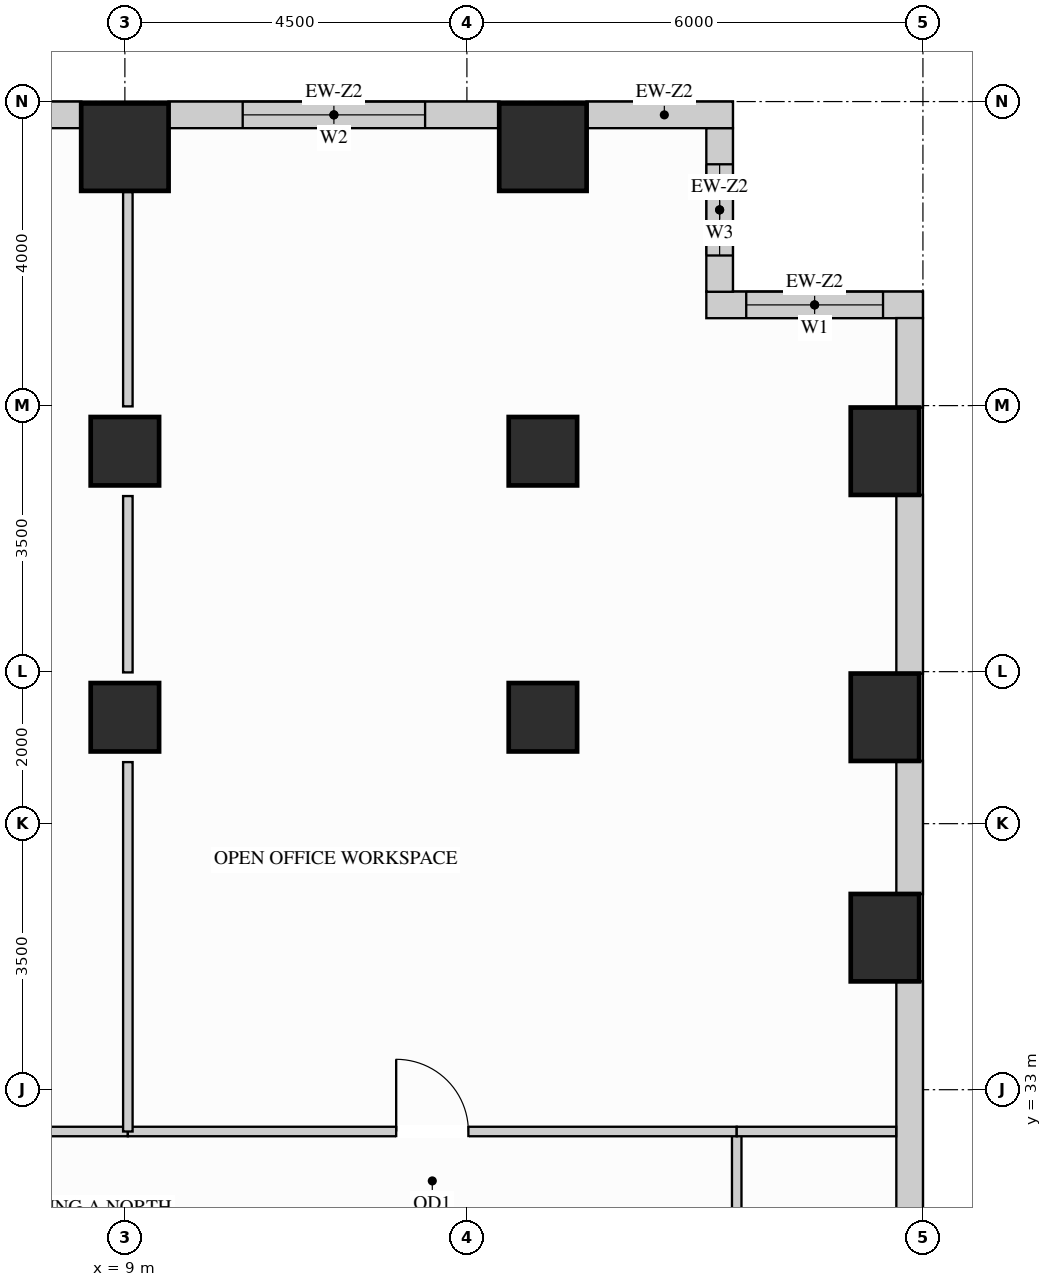
"""IFC4 building model, lengths in metres.
Left out: names, types, materials, properties, quantities, classifications, styles, units other than length and angle.
Written with IfcOpenShell. Run it as: python <this file> out.ifc"""

import sys

from ifc_helpers import new_model, si_unit, direction, frame, frame_2d, origin, origin_2d, place, context, subcontext, project, spatial, rectangle, extrude, source, transform, mapped, element, fill, save


model = new_model("IFC4")
c1 = context("Model", 3, precision=1e-05, world=origin(), true_north=direction((0.0, 1.0)))
c2 = subcontext(c1, "Body", "Model", "MODEL_VIEW")
j1 = project(units=[si_unit("LENGTHUNIT", "METRE"), si_unit("PLANEANGLEUNIT", "RADIAN")], contexts=[c1])
p1 = place(None, origin())
s1 = spatial("IfcSite", under=j1, at=p1, CompositionType="ELEMENT")
p2 = place(p1, origin())
s2 = spatial("IfcBuilding", under=s1, at=p2, CompositionType="ELEMENT")
p3 = place(p2, frame((0.0, 0.0, 81.0)))
s3 = spatial("IfcBuildingStorey", under=s2, at=p3, CompositionType="ELEMENT", Elevation=81.0)
m1 = source(origin(), c2, "Body", "SweptSolid", [
    extrude(rectangle(XDim=0.9, YDim=0.9, at=origin_2d()), origin(), (0.0, 0.0, 1.0), 3.38),
])
for number, where, z_axis, x_axis in (
    (1, (14.5, 37.9, 0.0), (0.0, 0.0, 1.0), (1.0, 0.0, 0.0)),
    (2, (14.5, 41.4, 0.0), (0.0, 0.0, 1.0), (1.0, 0.0, 0.0)),
    (3, (9.0, 37.9, 0.0), (0.0, 0.0, 1.0), (1.0, 0.0, 0.0)),
    (4, (9.0, 41.4, 0.0), (0.0, 0.0, 1.0), (1.0, 0.0, 0.0)),
):
    element("IfcColumn", number, at=place(p3, frame(where, z_axis=z_axis, x_axis=x_axis)), inside=s3, PredefinedType="COLUMN", context=c2, shape_type="MappedRepresentation", body=[
        mapped(m1, transform((0.0, 0.0, 0.0), x_axis=(1.0, 0.0, 0.0), y_axis=(0.0, 1.0, 0.0), z_axis=(0.0, 0.0, 1.0))),
    ])
m2 = source(origin(), c2, "Body", "SweptSolid", [
    extrude(rectangle(XDim=0.9, YDim=1.15, at=origin_2d()), origin(), (0.0, 0.0, 1.0), 3.38),
])
for number, where, z_axis, x_axis in (
    (5, (19.0, 35.0, 0.0), (0.0, 0.0, 1.0), (1.0, 0.0, 0.0)),
    (6, (19.0, 37.9, 0.0), (0.0, 0.0, 1.0), (1.0, 0.0, 0.0)),
    (7, (19.0, 41.4, 0.0), (0.0, 0.0, 1.0), (1.0, 0.0, 0.0)),
):
    element("IfcColumn", number, at=place(p3, frame(where, z_axis=z_axis, x_axis=x_axis)), inside=s3, PredefinedType="COLUMN", context=c2, shape_type="MappedRepresentation", body=[
        mapped(m2, transform((0.0, 0.0, 0.0), x_axis=(1.0, 0.0, 0.0), y_axis=(0.0, 1.0, 0.0), z_axis=(0.0, 0.0, 1.0))),
    ])
m3 = source(origin(), c2, "Body", "SweptSolid", [
    extrude(rectangle(XDim=1.15, YDim=1.15, at=origin_2d()), origin(), (0.0, 0.0, 1.0), 3.38),
])
for number, where, z_axis, x_axis in (
    (8, (14.5, 45.4, 0.0), (0.0, 0.0, 1.0), (1.0, 0.0, 0.0)),
    (9, (9.0, 45.4, 0.0), (0.0, 0.0, 1.0), (1.0, 0.0, 0.0)),
):
    element("IfcColumn", number, at=place(p3, frame(where, z_axis=z_axis, x_axis=x_axis)), inside=s3, PredefinedType="COLUMN", context=c2, shape_type="MappedRepresentation", body=[
        mapped(m3, transform((0.0, 0.0, 0.0), x_axis=(1.0, 0.0, 0.0), y_axis=(0.0, 1.0, 0.0), z_axis=(0.0, 0.0, 1.0))),
    ])
p4 = place(p3, frame((19.5, 43.325, 0.0), z_axis=(0.0, 0.0, 1.0), x_axis=(-1.0, 0.0, 0.0)))
e10 = element("IfcWall", 10, at=p4, inside=s3, PredefinedType="SOLIDWALL", context=c2, shape_type="SweptSolid", body=[
    extrude(rectangle(XDim=2.85, YDim=0.35, at=frame_2d((1.425, 0.0))), origin(), (0.0, 0.0, 1.0), 3.365),
])
p5 = place(p4, frame((0.525, 0.0, 0.78)))
e11 = element("IfcOpeningElement", 11, at=p5, cuts=e10, PredefinedType="OPENING", context=c2, shape_type="SweptSolid", body=[
    extrude(rectangle(XDim=1.8, YDim=2.1, at=frame_2d((0.9, 1.05))), frame((0.0, 0.185, 0.0), z_axis=(0.0, -1.0, 0.0), x_axis=(1.0, 0.0, 0.0)), (0.0, 0.0, 1.0), 0.37),
])
p6 = place(p3, frame((16.825, 43.498, 0.0), z_axis=(0.0, 0.0, 1.0), x_axis=(0.0, 1.0, 0.0)))
e12 = element("IfcWall", 12, at=p6, inside=s3, PredefinedType="SOLIDWALL", context=c2, shape_type="SweptSolid", body=[
    extrude(rectangle(XDim=2.154, YDim=0.35, at=frame_2d((1.077, 0.0))), origin(), (0.0, 0.0, 1.0), 3.365),
])
p7 = place(p6, frame((0.477, 0.0, 0.78)))
e13 = element("IfcOpeningElement", 13, at=p7, cuts=e12, PredefinedType="OPENING", context=c2, shape_type="SweptSolid", body=[
    extrude(rectangle(XDim=1.2, YDim=2.1, at=frame_2d((0.6, 1.05))), frame((0.0, 0.185, 0.0), z_axis=(0.0, -1.0, 0.0), x_axis=(1.0, 0.0, 0.0)), (0.0, 0.0, 1.0), 0.37),
])
m4 = source(origin(), c2, "Body", "SweptSolid", [
    extrude(rectangle(XDim=1.927, YDim=0.35, at=frame_2d((0.963, 0.0))), origin(), (0.0, 0.0, 1.0), 3.365),
])
p8 = place(p3, frame((17.0, 45.825, 0.0), z_axis=(0.0, 0.0, 1.0), x_axis=(-1.0, 0.0, 0.0)))
e14 = element("IfcWall", 14, at=p8, inside=s3, PredefinedType="SOLIDWALL", context=c2, shape_type="MappedRepresentation", body=[
    mapped(m4, transform((0.0, 0.0, 0.0), x_axis=(1.0, 0.0, 0.0), y_axis=(0.0, 1.0, 0.0), z_axis=(0.0, 0.0, 1.0))),
])
p9 = place(p3, frame((13.927, 45.825, 0.0), z_axis=(0.0, 0.0, 1.0), x_axis=(-1.0, 0.0, 0.0)))
e15 = element("IfcWall", 15, at=p9, inside=s3, PredefinedType="SOLIDWALL", context=c2, shape_type="SweptSolid", body=[
    extrude(rectangle(XDim=4.354, YDim=0.35, at=frame_2d((2.177, 0.0))), origin(), (0.0, 0.0, 1.0), 3.365),
])
p10 = place(p9, frame((0.977, 0.0, 0.78)))
e16 = element("IfcOpeningElement", 16, at=p10, cuts=e15, PredefinedType="OPENING", context=c2, shape_type="SweptSolid", body=[
    extrude(rectangle(XDim=2.4, YDim=2.1, at=frame_2d((1.2, 1.05))), frame((0.0, 0.185, 0.0), z_axis=(0.0, -1.0, 0.0), x_axis=(1.0, 0.0, 0.0)), (0.0, 0.0, 1.0), 0.37),
])
p11 = place(p3, frame((8.427, 45.825, 0.0), z_axis=(0.0, 0.0, 1.0), x_axis=(-1.0, 0.0, 0.0)))
e17 = element("IfcWall", 17, at=p11, inside=s3, PredefinedType="SOLIDWALL", context=c2, shape_type="SweptSolid", body=[
    extrude(rectangle(XDim=4.354, YDim=0.35, at=frame_2d((2.177, 0.0))), origin(), (0.0, 0.0, 1.0), 3.365),
])
p12 = place(p11, frame((0.977, 0.0, 0.78)))
e18 = element("IfcOpeningElement", 18, at=p12, cuts=e17, PredefinedType="OPENING", context=c2, shape_type="SweptSolid", body=[
    extrude(rectangle(XDim=2.4, YDim=2.1, at=frame_2d((1.2, 1.05))), frame((0.0, 0.185, 0.0), z_axis=(0.0, -1.0, 0.0), x_axis=(1.0, 0.0, 0.0)), (0.0, 0.0, 1.0), 0.37),
])
m5 = source(origin(), c2, "Body", "SweptSolid", [
    extrude(rectangle(XDim=3.354, YDim=0.35, at=frame_2d((1.677, 0.0))), origin(), (0.0, 0.0, 1.0), 2.519),
])
p13 = place(p3, frame((19.325, 31.073, 0.0), z_axis=(0.0, 0.0, 1.0), x_axis=(0.0, 1.0, 0.0)))
e19 = element("IfcWall", 19, at=p13, inside=s3, PredefinedType="SOLIDWALL", context=c2, shape_type="MappedRepresentation", body=[
    mapped(m5, transform((0.0, 0.0, 0.0), x_axis=(1.0, 0.0, 0.0), y_axis=(0.0, 1.0, 0.0), z_axis=(0.0, 0.0, 1.0))),
])
m6 = source(origin(), c2, "Body", "SweptSolid", [
    extrude(rectangle(XDim=1.754, YDim=0.35, at=frame_2d((0.877, 0.0))), origin(), (0.0, 0.0, 1.0), 2.519),
])
p14 = place(p3, frame((19.325, 35.573, 0.0), z_axis=(0.0, 0.0, 1.0), x_axis=(0.0, 1.0, 0.0)))
e20 = element("IfcWall", 20, at=p14, inside=s3, PredefinedType="SOLIDWALL", context=c2, shape_type="MappedRepresentation", body=[
    mapped(m6, transform((0.0, 0.0, 0.0), x_axis=(1.0, 0.0, 0.0), y_axis=(0.0, 1.0, 0.0), z_axis=(0.0, 0.0, 1.0))),
])
m7 = source(origin(), c2, "Body", "SweptSolid", [
    extrude(rectangle(XDim=2.354, YDim=0.35, at=frame_2d((1.177, 0.0))), origin(), (0.0, 0.0, 1.0), 2.519),
])
p15 = place(p3, frame((19.325, 38.473, 0.0), z_axis=(0.0, 0.0, 1.0), x_axis=(0.0, 1.0, 0.0)))
e21 = element("IfcWall", 21, at=p15, inside=s3, PredefinedType="SOLIDWALL", context=c2, shape_type="MappedRepresentation", body=[
    mapped(m7, transform((0.0, 0.0, 0.0), x_axis=(1.0, 0.0, 0.0), y_axis=(0.0, 1.0, 0.0), z_axis=(0.0, 0.0, 1.0))),
])
m8 = source(origin(), c2, "Body", "SweptSolid", [
    extrude(rectangle(XDim=1.179, YDim=0.35, at=frame_2d((0.59, 0.0))), origin(), (0.0, 0.0, 1.0), 3.365),
])
p16 = place(p3, frame((19.325, 41.973, 0.0), z_axis=(0.0, 0.0, 1.0), x_axis=(0.0, 1.0, 0.0)))
e22 = element("IfcWall", 22, at=p16, inside=s3, PredefinedType="SOLIDWALL", context=c2, shape_type="MappedRepresentation", body=[
    mapped(m8, transform((0.0, 0.0, 0.0), x_axis=(1.0, 0.0, 0.0), y_axis=(0.0, 1.0, 0.0), z_axis=(0.0, 0.0, 1.0))),
])
p17 = place(p3, frame((17.05, 26.05, 0.0), z_axis=(0.0, 0.0, 1.0), x_axis=(0.0, 1.0, 0.0)))
e23 = element("IfcWall", 23, at=p17, inside=s3, PredefinedType="PARTITIONING", context=c2, shape_type="SweptSolid", body=[
    extrude(rectangle(XDim=6.4, YDim=0.125, at=frame_2d((3.2, 0.0))), origin(), (0.0, 0.0, 1.0), 3.365),
])
p18 = place(p17, frame((2.725, 0.0, 0.0)))
e24 = element("IfcOpeningElement", 24, at=p18, cuts=e23, PredefinedType="OPENING", context=c2, shape_type="SweptSolid", body=[
    extrude(rectangle(XDim=0.95, YDim=2.15, at=frame_2d((0.475, 1.075))), frame((0.0, 0.073, 0.0), z_axis=(0.0, -1.0, 0.0), x_axis=(1.0, 0.0, 0.0)), (0.0, 0.0, 1.0), 0.145),
])
p19 = place(p3, frame((2.45, 32.45, 0.0), z_axis=(0.0, 0.0, 1.0), x_axis=(1.0, 0.0, 0.0)))
e25 = element("IfcWall", 25, at=p19, inside=s3, PredefinedType="PARTITIONING", context=c2, shape_type="SweptSolid", body=[
    extrude(rectangle(XDim=6.589, YDim=0.125, at=frame_2d((3.294, 0.0))), origin(), (0.0, 0.0, 1.0), 3.365),
])
p20 = place(p19, frame((2.82, 0.0, 0.0)))
e26 = element("IfcOpeningElement", 26, at=p20, cuts=e25, PredefinedType="OPENING", context=c2, shape_type="SweptSolid", body=[
    extrude(rectangle(XDim=0.95, YDim=2.15, at=frame_2d((0.475, 1.075))), frame((0.0, 0.073, 0.0), z_axis=(0.0, -1.0, 0.0), x_axis=(1.0, 0.0, 0.0)), (0.0, 0.0, 1.0), 0.145),
])
p21 = place(p3, frame((9.039, 32.45, 0.0), z_axis=(0.0, 0.0, 1.0), x_axis=(1.0, 0.0, 0.0)))
e27 = element("IfcWall", 27, at=p21, inside=s3, PredefinedType="PARTITIONING", context=c2, shape_type="SweptSolid", body=[
    extrude(rectangle(XDim=8.011, YDim=0.125, at=frame_2d((4.005, 0.0))), origin(), (0.0, 0.0, 1.0), 3.365),
])
p22 = place(p21, frame((3.531, 0.0, 0.0)))
e28 = element("IfcOpeningElement", 28, at=p22, cuts=e27, PredefinedType="OPENING", context=c2, shape_type="SweptSolid", body=[
    extrude(rectangle(XDim=0.95, YDim=2.15, at=frame_2d((0.475, 1.075))), frame((0.0, 0.073, 0.0), z_axis=(0.0, -1.0, 0.0), x_axis=(1.0, 0.0, 0.0)), (0.0, 0.0, 1.0), 0.145),
])
m9 = source(origin(), c2, "Body", "SweptSolid", [
    extrude(rectangle(XDim=2.098, YDim=0.125, at=frame_2d((1.049, 0.0))), origin(), (0.0, 0.0, 1.0), 3.365),
])
p23 = place(p3, frame((17.05, 32.45, 0.0), z_axis=(0.0, 0.0, 1.0), x_axis=(1.0, 0.0, 0.0)))
e29 = element("IfcWall", 29, at=p23, inside=s3, PredefinedType="PARTITIONING", context=c2, shape_type="MappedRepresentation", body=[
    mapped(m9, transform((0.0, 0.0, 0.0), x_axis=(1.0, 0.0, 0.0), y_axis=(0.0, 1.0, 0.0), z_axis=(0.0, 0.0, 1.0))),
])
m10 = source(origin(), c2, "Body", "SweptSolid", [
    extrude(rectangle(XDim=4.86, YDim=0.125, at=frame_2d((2.43, 0.0))), origin(), (0.0, 0.0, 1.0), 3.365),
])
p24 = place(p3, frame((9.039, 32.45, 0.0), z_axis=(0.0, 0.0, 1.0), x_axis=(0.0, 1.0, 0.0)))
e30 = element("IfcWall", 30, at=p24, inside=s3, PredefinedType="PARTITIONING", context=c2, shape_type="MappedRepresentation", body=[
    mapped(m10, transform((0.0, 0.0, 0.0), x_axis=(1.0, 0.0, 0.0), y_axis=(0.0, 1.0, 0.0), z_axis=(0.0, 0.0, 1.0))),
])
m11 = source(origin(), c2, "Body", "SweptSolid", [
    extrude(rectangle(XDim=2.32, YDim=0.125, at=frame_2d((1.16, 0.0))), origin(), (0.0, 0.0, 1.0), 2.677),
])
p25 = place(p3, frame((9.039, 38.49, 0.0), z_axis=(0.0, 0.0, 1.0), x_axis=(0.0, 1.0, 0.0)))
e31 = element("IfcWall", 31, at=p25, inside=s3, PredefinedType="PARTITIONING", context=c2, shape_type="MappedRepresentation", body=[
    mapped(m11, transform((0.0, 0.0, 0.0), x_axis=(1.0, 0.0, 0.0), y_axis=(0.0, 1.0, 0.0), z_axis=(0.0, 0.0, 1.0))),
])
m12 = source(origin(), c2, "Body", "SweptSolid", [
    extrude(rectangle(XDim=2.82, YDim=0.125, at=frame_2d((1.41, 0.0))), origin(), (0.0, 0.0, 1.0), 2.677),
])
p26 = place(p3, frame((9.039, 41.99, 0.0), z_axis=(0.0, 0.0, 1.0), x_axis=(0.0, 1.0, 0.0)))
e32 = element("IfcWall", 32, at=p26, inside=s3, PredefinedType="PARTITIONING", context=c2, shape_type="MappedRepresentation", body=[
    mapped(m12, transform((0.0, 0.0, 0.0), x_axis=(1.0, 0.0, 0.0), y_axis=(0.0, 1.0, 0.0), z_axis=(0.0, 0.0, 1.0))),
])
m13 = source(origin(), c2, "Body", "SweptSolid", [
    extrude(rectangle(XDim=0.95, YDim=2.15, at=frame_2d((0.475, 1.075))), frame((0.0, 0.025, 0.0), z_axis=(0.0, -1.0, 0.0), x_axis=(1.0, 0.0, 0.0)), (0.0, 0.0, 1.0), 0.05),
])
p27 = place(p22, origin())
e33 = element("IfcDoor", 33, at=p27, inside=s3, OperationType="SINGLE_SWING_LEFT", PredefinedType="DOOR", context=c2, shape_type="MappedRepresentation", body=[
    mapped(m13, transform((0.0, 0.0, 0.0), x_axis=(1.0, 0.0, 0.0), y_axis=(0.0, 1.0, 0.0), z_axis=(0.0, 0.0, 1.0))),
])
fill(e28, e33)
m14 = source(origin(), c2, "Body", "SweptSolid", [
    extrude(rectangle(XDim=1.8, YDim=2.1, at=frame_2d((0.9, 1.05))), frame((0.0, 0.03, 0.0), z_axis=(0.0, -1.0, 0.0), x_axis=(1.0, 0.0, 0.0)), (0.0, 0.0, 1.0), 0.06),
])
p28 = place(p5, origin())
e34 = element("IfcWindow", 34, at=p28, inside=s3, PartitioningType="SINGLE_PANEL", PredefinedType="WINDOW", context=c2, shape_type="MappedRepresentation", body=[
    mapped(m14, transform((0.0, 0.0, 0.0), x_axis=(1.0, 0.0, 0.0), y_axis=(0.0, 1.0, 0.0), z_axis=(0.0, 0.0, 1.0))),
])
fill(e11, e34)
m15 = source(origin(), c2, "Body", "SweptSolid", [
    extrude(rectangle(XDim=2.4, YDim=2.1, at=frame_2d((1.2, 1.05))), frame((0.0, 0.03, 0.0), z_axis=(0.0, -1.0, 0.0), x_axis=(1.0, 0.0, 0.0)), (0.0, 0.0, 1.0), 0.06),
])
p29 = place(p10, origin())
e35 = element("IfcWindow", 35, at=p29, inside=s3, PartitioningType="SINGLE_PANEL", PredefinedType="WINDOW", context=c2, shape_type="MappedRepresentation", body=[
    mapped(m15, transform((0.0, 0.0, 0.0), x_axis=(1.0, 0.0, 0.0), y_axis=(0.0, 1.0, 0.0), z_axis=(0.0, 0.0, 1.0))),
])
fill(e16, e35)
m16 = source(origin(), c2, "Body", "SweptSolid", [
    extrude(rectangle(XDim=1.2, YDim=2.1, at=frame_2d((0.6, 1.05))), frame((0.0, 0.03, 0.0), z_axis=(0.0, -1.0, 0.0), x_axis=(1.0, 0.0, 0.0)), (0.0, 0.0, 1.0), 0.06),
])
p30 = place(p7, origin())
e36 = element("IfcWindow", 36, at=p30, inside=s3, PartitioningType="SINGLE_PANEL", PredefinedType="WINDOW", context=c2, shape_type="MappedRepresentation", body=[
    mapped(m16, transform((0.0, 0.0, 0.0), x_axis=(1.0, 0.0, 0.0), y_axis=(0.0, 1.0, 0.0), z_axis=(0.0, 0.0, 1.0))),
])
fill(e13, e36)
save(model, sys.argv[1])
